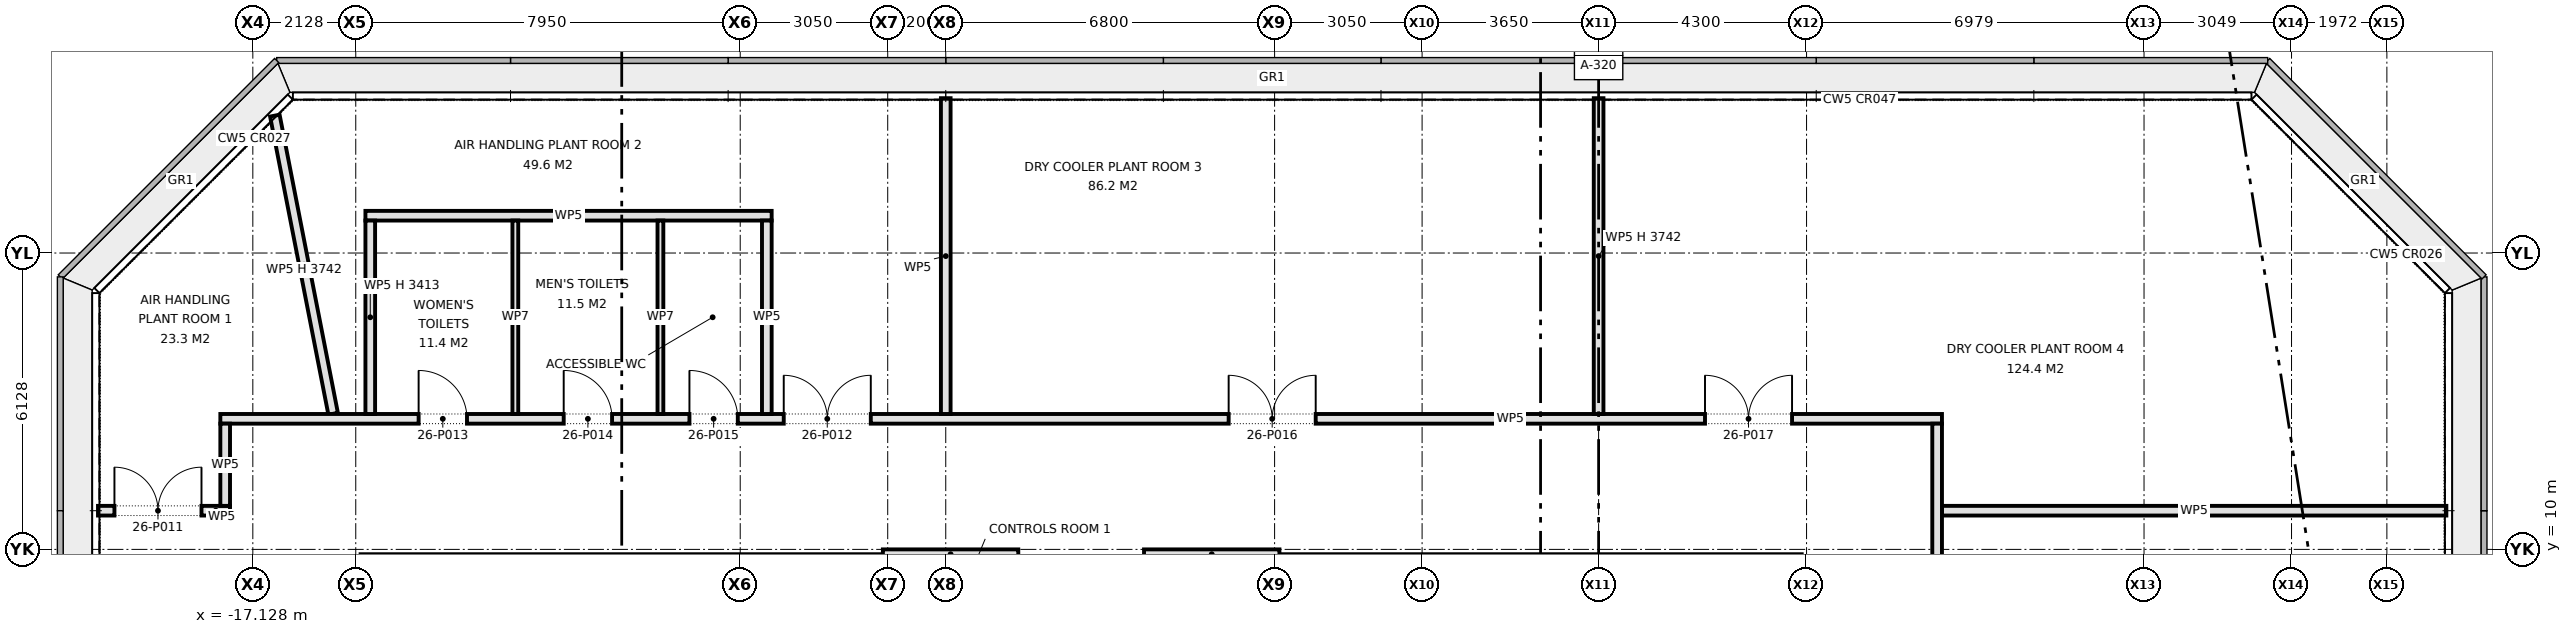
"""IFC4 building model, lengths in metres.
Left out: names, types, materials, properties, quantities, classifications, styles, units other than length and angle.
Written with IfcOpenShell. Run it as: python <this file> out.ifc"""

import sys

from ifc_helpers import new_model, si_unit, direction, frame, frame_2d, origin, place, context, subcontext, project, spatial, rectangle, extrude, element, fill, save


model = new_model("IFC4")
c1 = context("Model", 3, precision=1e-05, world=origin(), true_north=direction((0.0, 1.0)))
c2 = subcontext(c1, "Body", "Model", "MODEL_VIEW")
j1 = project(units=[si_unit("LENGTHUNIT", "METRE"), si_unit("PLANEANGLEUNIT", "RADIAN")], contexts=[c1])
p1 = place(None, origin())
s1 = spatial("IfcSite", under=j1, at=p1, CompositionType="ELEMENT")
p2 = place(p1, origin())
s2 = spatial("IfcBuilding", under=s1, at=p2, CompositionType="ELEMENT")
p3 = place(p2, frame((0.0, 0.0, 120.4)))
s3 = spatial("IfcBuildingStorey", under=s2, at=p3, CompositionType="ELEMENT", Elevation=120.4)
p4 = place(p3, frame((-16.673, 18.969, 0.0), z_axis=(0.0, 0.0, 1.0), x_axis=(0.191831771799, -0.981427822781, 0.0)))
e1 = element("IfcWall", 1, at=p4, inside=s3, PredefinedType="PARTITIONING", context=c2, shape_type="SweptSolid", body=[
    extrude(rectangle(XDim=6.282, YDim=0.2, at=frame_2d((3.141, 0.0))), origin(), (0.0, 0.0, 1.0), 3.742),
])
for number, where, z_axis, x_axis in (
    (2, (-4.1, 9.9, 0.0), (0.0, 0.0, 1.0), (1.0, 0.0, 0.0)),
    (3, (1.3, 9.9, 0.0), (0.0, 0.0, 1.0), (1.0, 0.0, 0.0)),
):
    element("IfcWall", number, at=place(p3, frame(where, z_axis=z_axis, x_axis=x_axis)), inside=s3, PredefinedType="PARTITIONING", context=c2, shape_type="SweptSolid", body=[
        extrude(rectangle(XDim=2.8, YDim=0.2, at=frame_2d((1.4, 0.0))), origin(), (0.0, 0.0, 1.0), 4.34),
    ])
p5 = place(p3, frame((-20.33, 10.8, 0.0), z_axis=(0.0, 0.0, 1.0), x_axis=(1.0, 0.0, 0.0)))
e4 = element("IfcWall", 4, at=p5, inside=s3, PredefinedType="PARTITIONING", context=c2, shape_type="SweptSolid", body=[
    extrude(rectangle(XDim=2.73, YDim=0.2, at=frame_2d((1.365, 0.0))), origin(), (0.0, 0.0, 1.0), 4.34),
])
p6 = place(p5, frame((0.34, 0.0, 0.0)))
e5 = element("IfcOpeningElement", 5, at=p6, cuts=e4, PredefinedType="OPENING", context=c2, shape_type="SweptSolid", body=[
    extrude(rectangle(XDim=1.8, YDim=2.1, at=frame_2d((0.9, 1.05))), frame((0.0, 0.11, 0.0), z_axis=(0.0, -1.0, 0.0), x_axis=(1.0, 0.0, 0.0)), (0.0, 0.0, 1.0), 0.22),
])
p7 = place(p3, frame((17.8, 10.8, 0.0), z_axis=(0.0, 0.0, 1.0), x_axis=(1.0, 0.0, 0.0)))
e6 = element("IfcWall", 6, at=p7, inside=s3, PredefinedType="PARTITIONING", context=c2, shape_type="SweptSolid", body=[
    extrude(rectangle(XDim=10.43, YDim=0.2, at=frame_2d((5.215, 0.0))), origin(), (0.0, 0.0, 1.0), 4.34),
])
p8 = place(p3, frame((-17.8, 12.7, 0.0), z_axis=(0.0, 0.0, 1.0), x_axis=(1.0, 0.0, 0.0)))
e7 = element("IfcWall", 7, at=p8, inside=s3, PredefinedType="PARTITIONING", context=c2, shape_type="SweptSolid", body=[
    extrude(rectangle(XDim=35.6, YDim=0.2, at=frame_2d((17.8, 0.0))), origin(), (0.0, 0.0, 1.0), 4.34),
])
p9 = place(p8, frame((11.65, 0.0, 0.0)))
e8 = element("IfcOpeningElement", 8, at=p9, cuts=e7, PredefinedType="OPENING", context=c2, shape_type="SweptSolid", body=[
    extrude(rectangle(XDim=1.8, YDim=2.1, at=frame_2d((0.9, 1.05))), frame((0.0, 0.11, 0.0), z_axis=(0.0, -1.0, 0.0), x_axis=(1.0, 0.0, 0.0)), (0.0, 0.0, 1.0), 0.22),
])
p10 = place(p8, frame((4.1, 0.0, 0.0)))
e9 = element("IfcOpeningElement", 9, at=p10, cuts=e7, PredefinedType="OPENING", context=c2, shape_type="SweptSolid", body=[
    extrude(rectangle(XDim=1.0, YDim=2.1, at=frame_2d((0.5, 1.05))), frame((0.0, 0.11, 0.0), z_axis=(0.0, -1.0, 0.0), x_axis=(1.0, 0.0, 0.0)), (0.0, 0.0, 1.0), 0.22),
])
p11 = place(p8, frame((7.1, 0.0, 0.0)))
e10 = element("IfcOpeningElement", 10, at=p11, cuts=e7, PredefinedType="OPENING", context=c2, shape_type="SweptSolid", body=[
    extrude(rectangle(XDim=1.0, YDim=2.1, at=frame_2d((0.5, 1.05))), frame((0.0, 0.11, 0.0), z_axis=(0.0, -1.0, 0.0), x_axis=(1.0, 0.0, 0.0)), (0.0, 0.0, 1.0), 0.22),
])
p12 = place(p8, frame((9.7, 0.0, 0.0)))
e11 = element("IfcOpeningElement", 11, at=p12, cuts=e7, PredefinedType="OPENING", context=c2, shape_type="SweptSolid", body=[
    extrude(rectangle(XDim=1.0, YDim=2.1, at=frame_2d((0.5, 1.05))), frame((0.0, 0.11, 0.0), z_axis=(0.0, -1.0, 0.0), x_axis=(1.0, 0.0, 0.0)), (0.0, 0.0, 1.0), 0.22),
])
p13 = place(p8, frame((20.85, 0.0, 0.0)))
e12 = element("IfcOpeningElement", 12, at=p13, cuts=e7, PredefinedType="OPENING", context=c2, shape_type="SweptSolid", body=[
    extrude(rectangle(XDim=1.8, YDim=2.1, at=frame_2d((0.9, 1.05))), frame((0.0, 0.11, 0.0), z_axis=(0.0, -1.0, 0.0), x_axis=(1.0, 0.0, 0.0)), (0.0, 0.0, 1.0), 0.22),
])
p14 = place(p8, frame((30.7, 0.0, 0.0)))
e13 = element("IfcOpeningElement", 13, at=p14, cuts=e7, PredefinedType="OPENING", context=c2, shape_type="SweptSolid", body=[
    extrude(rectangle(XDim=1.8, YDim=2.1, at=frame_2d((0.9, 1.05))), frame((0.0, 0.11, 0.0), z_axis=(0.0, -1.0, 0.0), x_axis=(1.0, 0.0, 0.0)), (0.0, 0.0, 1.0), 0.22),
])
p15 = place(p3, frame((-14.8, 16.9, 0.0), z_axis=(0.0, 0.0, 1.0), x_axis=(1.0, 0.0, 0.0)))
e14 = element("IfcWall", 14, at=p15, inside=s3, PredefinedType="PARTITIONING", context=c2, shape_type="SweptSolid", body=[
    extrude(rectangle(XDim=8.4, YDim=0.2, at=frame_2d((4.2, 0.0))), origin(), (0.0, 0.0, 1.0), 4.34),
])
p16 = place(p3, frame((17.7, -12.6, 0.0), z_axis=(0.0, 0.0, 1.0), x_axis=(0.0, 1.0, 0.0)))
e15 = element("IfcWall", 15, at=p16, inside=s3, PredefinedType="PARTITIONING", context=c2, shape_type="SweptSolid", body=[
    extrude(rectangle(XDim=25.2, YDim=0.2, at=frame_2d((12.6, 0.0))), origin(), (0.0, 0.0, 1.0), 4.34),
])
p17 = place(p16, frame((6.25, 0.0, 0.0)))
e16 = element("IfcOpeningElement", 16, at=p17, cuts=e15, PredefinedType="OPENING", context=c2, shape_type="SweptSolid", body=[
    extrude(rectangle(XDim=1.8, YDim=2.1, at=frame_2d((0.9, 1.05))), frame((0.0, 0.11, 0.0), z_axis=(0.0, -1.0, 0.0), x_axis=(1.0, 0.0, 0.0)), (0.0, 0.0, 1.0), 0.22),
])
p18 = place(p16, frame((18.0, 0.0, 0.0)))
e17 = element("IfcOpeningElement", 17, at=p18, cuts=e15, PredefinedType="OPENING", context=c2, shape_type="SweptSolid", body=[
    extrude(rectangle(XDim=1.8, YDim=2.1, at=frame_2d((0.9, 1.05))), frame((0.0, 0.11, 0.0), z_axis=(0.0, -1.0, 0.0), x_axis=(1.0, 0.0, 0.0)), (0.0, 0.0, 1.0), 0.22),
])
p19 = place(p3, frame((10.7, 12.8, 0.0), z_axis=(0.0, 0.0, 1.0), x_axis=(0.0, 1.0, 0.0)))
e18 = element("IfcWall", 18, at=p19, inside=s3, PredefinedType="PARTITIONING", context=c2, shape_type="SweptSolid", body=[
    extrude(rectangle(XDim=6.53, YDim=0.2, at=frame_2d((3.265, 0.0))), origin(), (0.0, 0.0, 1.0), 3.742),
])
p20 = place(p3, frame((-2.8, 12.8, 0.0), z_axis=(0.0, 0.0, 1.0), x_axis=(0.0, 1.0, 0.0)))
e19 = element("IfcWall", 19, at=p20, inside=s3, PredefinedType="PARTITIONING", context=c2, shape_type="SweptSolid", body=[
    extrude(rectangle(XDim=6.53, YDim=0.2, at=frame_2d((3.265, 0.0))), origin(), (0.0, 0.0, 1.0), 4.34),
])
p21 = place(p3, frame((-6.5, 12.8, 0.0), z_axis=(0.0, 0.0, 1.0), x_axis=(0.0, 1.0, 0.0)))
e20 = element("IfcWall", 20, at=p21, inside=s3, PredefinedType="PARTITIONING", context=c2, shape_type="SweptSolid", body=[
    extrude(rectangle(XDim=4.0, YDim=0.2, at=frame_2d((2.0, 0.0))), origin(), (0.0, 0.0, 1.0), 4.34),
])
p22 = place(p3, frame((-14.7, 12.8, 0.0), z_axis=(0.0, 0.0, 1.0), x_axis=(0.0, 1.0, 0.0)))
e21 = element("IfcWall", 21, at=p22, inside=s3, PredefinedType="PARTITIONING", context=c2, shape_type="SweptSolid", body=[
    extrude(rectangle(XDim=4.0, YDim=0.2, at=frame_2d((2.0, 0.0))), origin(), (0.0, 0.0, 1.0), 3.413),
])
p23 = place(p3, frame((-17.7, 10.9, 0.0), z_axis=(0.0, 0.0, 1.0), x_axis=(0.0, 1.0, 0.0)))
e22 = element("IfcWall", 22, at=p23, inside=s3, PredefinedType="PARTITIONING", context=c2, shape_type="SweptSolid", body=[
    extrude(rectangle(XDim=1.7, YDim=0.2, at=frame_2d((0.85, 0.0))), origin(), (0.0, 0.0, 1.0), 4.34),
])
for number, where, z_axis, x_axis in (
    (23, (-8.7, 12.8, 0.0), (0.0, 0.0, 1.0), (0.0, 1.0, 0.0)),
    (24, (-11.7, 12.8, 0.0), (0.0, 0.0, 1.0), (0.0, 1.0, 0.0)),
):
    element("IfcWall", number, at=place(p3, frame(where, z_axis=z_axis, x_axis=x_axis)), inside=s3, PredefinedType="PARTITIONING", context=c2, shape_type="SweptSolid", body=[
        extrude(rectangle(XDim=4.0, YDim=0.12, at=frame_2d((2.0, 0.0))), origin(), (0.0, 0.0, 1.0), 4.34),
    ])
p24 = place(p6, origin())
e25 = element("IfcDoor", 25, at=p24, inside=s3, OperationType="DOUBLE_DOOR_SINGLE_SWING", PredefinedType="DOOR", context=c2, shape_type="SweptSolid", body=[
    extrude(rectangle(XDim=1.8, YDim=2.1, at=frame_2d((0.9, 1.05))), frame((0.0, 0.025, 0.0), z_axis=(0.0, -1.0, 0.0), x_axis=(1.0, 0.0, 0.0)), (0.0, 0.0, 1.0), 0.05),
])
fill(e5, e25)
p25 = place(p9, origin())
e26 = element("IfcDoor", 26, at=p25, inside=s3, OperationType="DOUBLE_DOOR_SINGLE_SWING", PredefinedType="DOOR", context=c2, shape_type="SweptSolid", body=[
    extrude(rectangle(XDim=1.8, YDim=2.1, at=frame_2d((0.9, 1.05))), frame((0.0, 0.025, 0.0), z_axis=(0.0, -1.0, 0.0), x_axis=(1.0, 0.0, 0.0)), (0.0, 0.0, 1.0), 0.05),
])
fill(e8, e26)
p26 = place(p10, origin())
e27 = element("IfcDoor", 27, at=p26, inside=s3, OperationType="SINGLE_SWING_LEFT", PredefinedType="DOOR", context=c2, shape_type="SweptSolid", body=[
    extrude(rectangle(XDim=1.0, YDim=2.1, at=frame_2d((0.5, 1.05))), frame((0.0, 0.025, 0.0), z_axis=(0.0, -1.0, 0.0), x_axis=(1.0, 0.0, 0.0)), (0.0, 0.0, 1.0), 0.05),
])
fill(e9, e27)
p27 = place(p11, origin())
e28 = element("IfcDoor", 28, at=p27, inside=s3, OperationType="SINGLE_SWING_LEFT", PredefinedType="DOOR", context=c2, shape_type="SweptSolid", body=[
    extrude(rectangle(XDim=1.0, YDim=2.1, at=frame_2d((0.5, 1.05))), frame((0.0, 0.025, 0.0), z_axis=(0.0, -1.0, 0.0), x_axis=(1.0, 0.0, 0.0)), (0.0, 0.0, 1.0), 0.05),
])
fill(e10, e28)
p28 = place(p12, origin())
e29 = element("IfcDoor", 29, at=p28, inside=s3, OperationType="SINGLE_SWING_LEFT", PredefinedType="DOOR", context=c2, shape_type="SweptSolid", body=[
    extrude(rectangle(XDim=1.0, YDim=2.1, at=frame_2d((0.5, 1.05))), frame((0.0, 0.025, 0.0), z_axis=(0.0, -1.0, 0.0), x_axis=(1.0, 0.0, 0.0)), (0.0, 0.0, 1.0), 0.05),
])
fill(e11, e29)
p29 = place(p13, origin())
e30 = element("IfcDoor", 30, at=p29, inside=s3, OperationType="DOUBLE_DOOR_SINGLE_SWING", PredefinedType="DOOR", context=c2, shape_type="SweptSolid", body=[
    extrude(rectangle(XDim=1.8, YDim=2.1, at=frame_2d((0.9, 1.05))), frame((0.0, 0.025, 0.0), z_axis=(0.0, -1.0, 0.0), x_axis=(1.0, 0.0, 0.0)), (0.0, 0.0, 1.0), 0.05),
])
fill(e12, e30)
p30 = place(p14, origin())
e31 = element("IfcDoor", 31, at=p30, inside=s3, OperationType="DOUBLE_DOOR_SINGLE_SWING", PredefinedType="DOOR", context=c2, shape_type="SweptSolid", body=[
    extrude(rectangle(XDim=1.8, YDim=2.1, at=frame_2d((0.9, 1.05))), frame((0.0, 0.025, 0.0), z_axis=(0.0, -1.0, 0.0), x_axis=(1.0, 0.0, 0.0)), (0.0, 0.0, 1.0), 0.05),
])
fill(e13, e31)
save(model, sys.argv[1])
